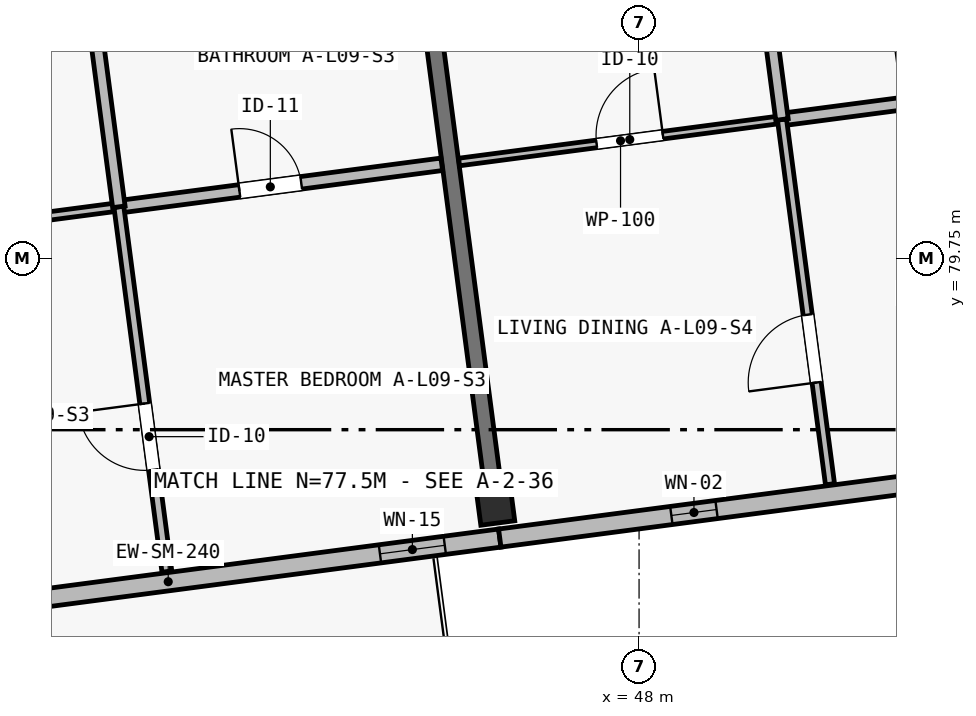
"""IFC4 building model, lengths in metres.
Left out: names, types, materials, properties, quantities, classifications, styles, units other than length and angle.
Written with IfcOpenShell. Run it as: python <this file> out.ifc"""

import sys

from ifc_helpers import new_model, si_unit, direction, frame, frame_2d, origin, origin_2d, place, context, subcontext, project, spatial, rectangle, extrude, element, fill, save


model = new_model("IFC4")
c1 = context("Model", 3, precision=1e-05, world=origin(), true_north=direction((0.0, 1.0)))
c2 = subcontext(c1, "Body", "Model", "MODEL_VIEW")
j1 = project(units=[si_unit("LENGTHUNIT", "METRE"), si_unit("PLANEANGLEUNIT", "RADIAN")], contexts=[c1])
p1 = place(None, origin())
s1 = spatial("IfcSite", under=j1, at=p1, CompositionType="ELEMENT")
p2 = place(p1, origin())
s2 = spatial("IfcBuilding", under=s1, at=p2, CompositionType="ELEMENT")
p3 = place(p2, frame((0.0, 0.0, 31.15)))
s3 = spatial("IfcBuildingStorey", under=s2, at=p3, CompositionType="ELEMENT", Elevation=31.15)
p4 = place(p3, frame((46.099, 76.594, 0.0), z_axis=(0.0, 0.0, 1.0), x_axis=(0.991444861374, 0.13052619222, 0.0)))
e1 = element("IfcColumn", 1, at=p4, inside=s3, PredefinedType="COLUMN", context=c2, shape_type="SweptSolid", body=[
    extrude(rectangle(XDim=0.45, YDim=0.65, at=origin_2d()), origin(), (0.0, 0.0, 1.0), 3.25),
])
p5 = place(p3, frame((46.056, 76.917, 0.0), z_axis=(0.0, 0.0, 1.0), x_axis=(-0.130503975686, 0.991447785983, 0.0)))
e2 = element("IfcWall", 2, at=p5, inside=s3, PredefinedType="SHEAR", context=c2, shape_type="SweptSolid", body=[
    extrude(rectangle(XDim=7.15, YDim=0.22, at=frame_2d((3.575, 0.0))), origin(), (0.0, 0.0, 1.0), 2.5),
])
p6 = place(p3, frame((46.167, 76.074, 0.0), z_axis=(0.0, 0.0, 1.0), x_axis=(-0.991444377792, -0.130529865336, 0.0)))
e3 = element("IfcWall", 3, at=p6, inside=s3, PredefinedType="SOLIDWALL", context=c2, shape_type="SweptSolid", body=[
    extrude(rectangle(XDim=8.8, YDim=0.24, at=frame_2d((4.4, 0.0))), origin(), (0.0, 0.0, 1.0), 3.0),
])
p7 = place(p6, frame((6.147, 0.0, 0.0)))
e4 = element("IfcOpeningElement", 4, at=p7, cuts=e3, PredefinedType="OPENING", context=c2, shape_type="SweptSolid", body=[
    extrude(rectangle(XDim=1.5, YDim=2.12, at=frame_2d((0.75, 1.06))), frame((0.0, 0.135, 0.0), z_axis=(0.0, -1.0, 0.0), x_axis=(1.0, 0.0, 0.0)), (0.0, 0.0, 1.0), 0.27),
])
p8 = place(p6, frame((0.73, 0.0, 0.42)))
e5 = element("IfcOpeningElement", 5, at=p8, cuts=e3, PredefinedType="OPENING", context=c2, shape_type="SweptSolid", body=[
    extrude(rectangle(XDim=0.86, YDim=2.36, at=frame_2d((0.43, 1.18))), frame((0.0, 0.135, 0.0), z_axis=(0.0, -1.0, 0.0), x_axis=(1.0, 0.0, 0.0)), (0.0, 0.0, 1.0), 0.27),
])
p9 = place(p3, frame((54.892, 77.223, 0.0), z_axis=(0.0, 0.0, 1.0), x_axis=(-0.991443905089, -0.130533455715, 0.0)))
e6 = element("IfcWall", 6, at=p9, inside=s3, PredefinedType="SOLIDWALL", context=c2, shape_type="SweptSolid", body=[
    extrude(rectangle(XDim=8.8, YDim=0.24, at=frame_2d((4.4, 0.0))), origin(), (0.0, 0.0, 1.0), 3.0),
])
p10 = place(p9, frame((0.61, 0.0, 0.48)))
e7 = element("IfcOpeningElement", 7, at=p10, cuts=e6, PredefinedType="OPENING", context=c2, shape_type="SweptSolid", body=[
    extrude(rectangle(XDim=0.84, YDim=2.28, at=frame_2d((0.42, 1.14))), frame((0.0, 0.135, 0.0), z_axis=(0.0, -1.0, 0.0), x_axis=(1.0, 0.0, 0.0)), (0.0, 0.0, 1.0), 0.27),
])
p11 = place(p9, frame((2.336, 0.0, 0.5)))
e8 = element("IfcOpeningElement", 8, at=p11, cuts=e6, PredefinedType="OPENING", context=c2, shape_type="SweptSolid", body=[
    extrude(rectangle(XDim=0.86, YDim=2.36, at=frame_2d((0.43, 1.18))), frame((0.0, 0.135, 0.0), z_axis=(0.0, -1.0, 0.0), x_axis=(1.0, 0.0, 0.0)), (0.0, 0.0, 1.0), 0.27),
])
p12 = place(p9, frame((5.923, 0.0, 0.48)))
e9 = element("IfcOpeningElement", 9, at=p12, cuts=e6, PredefinedType="OPENING", context=c2, shape_type="SweptSolid", body=[
    extrude(rectangle(XDim=0.6, YDim=2.22, at=frame_2d((0.3, 1.11))), frame((0.0, 0.135, 0.0), z_axis=(0.0, -1.0, 0.0), x_axis=(1.0, 0.0, 0.0)), (0.0, 0.0, 1.0), 0.27),
])
p13 = place(p3, frame((36.907, 79.873, 0.0), z_axis=(0.0, 0.0, 1.0), x_axis=(0.991444984965, 0.130525253451, 0.0)))
e10 = element("IfcWall", 10, at=p13, inside=s3, PredefinedType="PARTITIONING", context=c2, shape_type="SweptSolid", body=[
    extrude(rectangle(XDim=4.285, YDim=0.11, at=frame_2d((2.143, 0.0))), origin(), (0.0, 0.0, 1.0), 2.97),
])
p14 = place(p13, frame((1.825, 0.0, 0.0)))
e11 = element("IfcOpeningElement", 11, at=p14, cuts=e10, PredefinedType="OPENING", context=c2, shape_type="SweptSolid", body=[
    extrude(rectangle(XDim=0.9, YDim=2.1, at=frame_2d((0.45, 1.05))), frame((0.0, 0.07, 0.0), z_axis=(0.0, -1.0, 0.0), x_axis=(1.0, 0.0, 0.0)), (0.0, 0.0, 1.0), 0.14),
])
p15 = place(p3, frame((41.156, 80.432, 0.0), z_axis=(0.0, 0.0, 1.0), x_axis=(0.991444014242, 0.130532626667, 0.0)))
e12 = element("IfcWall", 12, at=p15, inside=s3, PredefinedType="PLUMBINGWALL", context=c2, shape_type="SweptSolid", body=[
    extrude(rectangle(XDim=4.285, YDim=0.165, at=frame_2d((2.143, 0.0))), origin(), (0.0, 0.0, 1.0), 2.97),
])
p16 = place(p15, frame((1.6, 0.0, 0.0)))
e13 = element("IfcOpeningElement", 13, at=p16, cuts=e12, PredefinedType="OPENING", context=c2, shape_type="SweptSolid", body=[
    extrude(rectangle(XDim=0.82, YDim=2.08, at=frame_2d((0.41, 1.04))), frame((0.0, 0.097, 0.0), z_axis=(0.0, -1.0, 0.0), x_axis=(1.0, 0.0, 0.0)), (0.0, 0.0, 1.0), 0.195),
])
p17 = place(p3, frame((41.787, 75.634, 0.0), z_axis=(0.0, 0.0, 1.0), x_axis=(-0.130494962676, 0.991448972321, 0.0)))
e14 = element("IfcWall", 14, at=p17, inside=s3, PredefinedType="PARTITIONING", context=c2, shape_type="SweptSolid", body=[
    extrude(rectangle(XDim=4.84, YDim=0.13, at=frame_2d((2.42, 0.0))), origin(), (0.0, 0.0, 1.0), 2.97),
])
p18 = place(p17, frame((1.35, 0.0, 0.0)))
e15 = element("IfcOpeningElement", 15, at=p18, cuts=e14, PredefinedType="OPENING", context=c2, shape_type="SweptSolid", body=[
    extrude(rectangle(XDim=0.88, YDim=2.1, at=frame_2d((0.44, 1.05))), frame((0.0, 0.08, 0.0), z_axis=(0.0, -1.0, 0.0), x_axis=(1.0, 0.0, 0.0)), (0.0, 0.0, 1.0), 0.16),
])
p19 = place(p3, frame((41.156, 80.432, 0.0), z_axis=(0.0, 0.0, 1.0), x_axis=(-0.130551670646, 0.991441506742, 0.0)))
e16 = element("IfcWall", 16, at=p19, inside=s3, PredefinedType="PLUMBINGWALL", context=c2, shape_type="SweptSolid", body=[
    extrude(rectangle(XDim=3.77, YDim=0.165, at=frame_2d((1.885, 0.0))), origin(), (0.0, 0.0, 1.0), 2.97),
])
p20 = place(p3, frame((45.632, 81.021, 0.0), z_axis=(0.0, 0.0, 1.0), x_axis=(0.991444014242, 0.130532626667, 0.0)))
e17 = element("IfcWall", 17, at=p20, inside=s3, PredefinedType="PARTITIONING", context=c2, shape_type="SweptSolid", body=[
    extrude(rectangle(XDim=4.285, YDim=0.1, at=frame_2d((2.143, 0.0))), origin(), (0.0, 0.0, 1.0), 2.97),
])
p21 = place(p20, frame((1.825, 0.0, 0.0)))
e18 = element("IfcOpeningElement", 18, at=p21, cuts=e17, PredefinedType="OPENING", context=c2, shape_type="SweptSolid", body=[
    extrude(rectangle(XDim=0.88, YDim=2.1, at=frame_2d((0.44, 1.05))), frame((0.0, 0.065, 0.0), z_axis=(0.0, -1.0, 0.0), x_axis=(1.0, 0.0, 0.0)), (0.0, 0.0, 1.0), 0.13),
])
p22 = place(p3, frame((49.88, 81.581, 0.0), z_axis=(0.0, 0.0, 1.0), x_axis=(0.991444014242, 0.130532626667, 0.0)))
e19 = element("IfcWall", 19, at=p22, inside=s3, PredefinedType="PLUMBINGWALL", context=c2, shape_type="SweptSolid", body=[
    extrude(rectangle(XDim=4.285, YDim=0.165, at=frame_2d((2.143, 0.0))), origin(), (0.0, 0.0, 1.0), 2.97),
])
p23 = place(p22, frame((1.6, 0.0, 0.0)))
e20 = element("IfcOpeningElement", 20, at=p23, cuts=e19, PredefinedType="OPENING", context=c2, shape_type="SweptSolid", body=[
    extrude(rectangle(XDim=0.82, YDim=2.08, at=frame_2d((0.41, 1.04))), frame((0.0, 0.097, 0.0), z_axis=(0.0, -1.0, 0.0), x_axis=(1.0, 0.0, 0.0)), (0.0, 0.0, 1.0), 0.195),
])
p24 = place(p3, frame((50.512, 76.782, 0.0), z_axis=(0.0, 0.0, 1.0), x_axis=(-0.130544545786, 0.991442444908, 0.0)))
e21 = element("IfcWall", 21, at=p24, inside=s3, PredefinedType="PARTITIONING", context=c2, shape_type="SweptSolid", body=[
    extrude(rectangle(XDim=4.84, YDim=0.12, at=frame_2d((2.42, 0.0))), origin(), (0.0, 0.0, 1.0), 2.97),
])
p25 = place(p24, frame((1.35, 0.0, 0.0)))
e22 = element("IfcOpeningElement", 22, at=p25, cuts=e21, PredefinedType="OPENING", context=c2, shape_type="SweptSolid", body=[
    extrude(rectangle(XDim=0.9, YDim=2.1, at=frame_2d((0.45, 1.05))), frame((0.0, 0.075, 0.0), z_axis=(0.0, -1.0, 0.0), x_axis=(1.0, 0.0, 0.0)), (0.0, 0.0, 1.0), 0.15),
])
p26 = place(p3, frame((49.88, 81.581, 0.0), z_axis=(0.0, 0.0, 1.0), x_axis=(-0.130551670646, 0.991441506742, 0.0)))
e23 = element("IfcWall", 23, at=p26, inside=s3, PredefinedType="PLUMBINGWALL", context=c2, shape_type="SweptSolid", body=[
    extrude(rectangle(XDim=3.77, YDim=0.165, at=frame_2d((1.885, 0.0))), origin(), (0.0, 0.0, 1.0), 2.97),
])
p27 = place(p8, origin())
e24 = element("IfcWindow", 24, at=p27, inside=s3, PartitioningType="SINGLE_PANEL", PredefinedType="WINDOW", context=c2, shape_type="SweptSolid", body=[
    extrude(rectangle(XDim=0.86, YDim=2.36, at=frame_2d((0.43, 1.18))), frame((0.0, 0.03, 0.0), z_axis=(0.0, -1.0, 0.0), x_axis=(1.0, 0.0, 0.0)), (0.0, 0.0, 1.0), 0.06),
])
fill(e5, e24)
p28 = place(p12, origin())
e25 = element("IfcWindow", 25, at=p28, inside=s3, PartitioningType="SINGLE_PANEL", PredefinedType="WINDOW", context=c2, shape_type="SweptSolid", body=[
    extrude(rectangle(XDim=0.6, YDim=2.22, at=frame_2d((0.3, 1.11))), frame((0.0, 0.03, 0.0), z_axis=(0.0, -1.0, 0.0), x_axis=(1.0, 0.0, 0.0)), (0.0, 0.0, 1.0), 0.06),
])
fill(e9, e25)
p29 = place(p16, origin())
e26 = element("IfcDoor", 26, at=p29, inside=s3, OperationType="SINGLE_SWING_LEFT", PredefinedType="DOOR", context=c2, shape_type="SweptSolid", body=[
    extrude(rectangle(XDim=0.82, YDim=2.08, at=frame_2d((0.41, 1.04))), frame((0.0, 0.025, 0.0), z_axis=(0.0, -1.0, 0.0), x_axis=(1.0, 0.0, 0.0)), (0.0, 0.0, 1.0), 0.05),
])
fill(e13, e26)
p30 = place(p18, origin())
e27 = element("IfcDoor", 27, at=p30, inside=s3, OperationType="SINGLE_SWING_RIGHT", PredefinedType="DOOR", context=c2, shape_type="SweptSolid", body=[
    extrude(rectangle(XDim=0.88, YDim=2.1, at=frame_2d((0.44, 1.05))), frame((0.0, 0.025, 0.0), z_axis=(0.0, -1.0, 0.0), x_axis=(1.0, 0.0, 0.0)), (0.0, 0.0, 1.0), 0.05),
])
fill(e15, e27)
p31 = place(p21, origin())
e28 = element("IfcDoor", 28, at=p31, inside=s3, OperationType="SINGLE_SWING_RIGHT", PredefinedType="DOOR", context=c2, shape_type="SweptSolid", body=[
    extrude(rectangle(XDim=0.88, YDim=2.1, at=frame_2d((0.44, 1.05))), frame((0.0, 0.025, 0.0), z_axis=(0.0, -1.0, 0.0), x_axis=(1.0, 0.0, 0.0)), (0.0, 0.0, 1.0), 0.05),
])
fill(e18, e28)
p32 = place(p25, origin())
e29 = element("IfcDoor", 29, at=p32, inside=s3, OperationType="SINGLE_SWING_LEFT", PredefinedType="DOOR", context=c2, shape_type="SweptSolid", body=[
    extrude(rectangle(XDim=0.9, YDim=2.1, at=frame_2d((0.45, 1.05))), frame((0.0, 0.025, 0.0), z_axis=(0.0, -1.0, 0.0), x_axis=(1.0, 0.0, 0.0)), (0.0, 0.0, 1.0), 0.05),
])
fill(e22, e29)
save(model, sys.argv[1])
